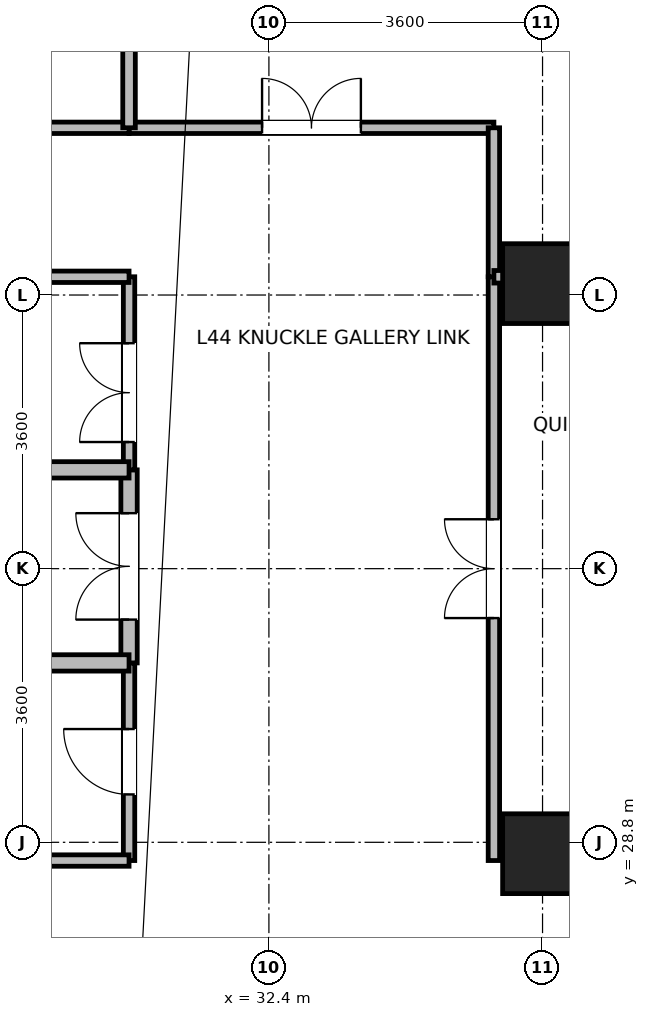
"""IFC4 building model, lengths in metres.
Left out: names, types, materials, properties, quantities, classifications, styles, units other than length and angle.
Written with IfcOpenShell. Run it as: python <this file> out.ifc"""

import sys

from ifc_helpers import new_model, si_unit, direction, frame, frame_2d, origin, origin_2d, place, context, subcontext, project, spatial, rectangle, extrude, source, transform, mapped, element, fill, save


model = new_model("IFC4")
c1 = context("Model", 3, precision=1e-05, world=origin(), true_north=direction((0.0, 1.0)))
c2 = subcontext(c1, "Body", "Model", "MODEL_VIEW")
j1 = project(units=[si_unit("LENGTHUNIT", "METRE"), si_unit("PLANEANGLEUNIT", "RADIAN")], contexts=[c1])
p1 = place(None, origin())
s1 = spatial("IfcSite", under=j1, at=p1, CompositionType="ELEMENT")
p2 = place(p1, origin())
s2 = spatial("IfcBuilding", under=s1, at=p2, CompositionType="ELEMENT")
p3 = place(p2, frame((0.0, 0.0, 173.5)))
s3 = spatial("IfcBuildingStorey", under=s2, at=p3, CompositionType="ELEMENT", Elevation=173.5)
m1 = source(origin(), c2, "Body", "SweptSolid", [
    extrude(rectangle(XDim=1.05, YDim=1.05, at=origin_2d()), origin(), (0.0, 0.0, 1.0), 3.7),
])
for number, where, z_axis, x_axis in (
    (1, (36.0, 28.65, 0.0), (0.0, 0.0, 1.0), (1.0, 0.0, 0.0)),
    (2, (36.0, 36.15, 0.0), (0.0, 0.0, 1.0), (1.0, 0.0, 0.0)),
):
    element("IfcColumn", number, at=place(p3, frame(where, z_axis=z_axis, x_axis=x_axis)), inside=s3, PredefinedType="COLUMN", context=c2, shape_type="MappedRepresentation", body=[
        mapped(m1, transform((0.0, 0.0, 0.0), x_axis=(1.0, 0.0, 0.0), y_axis=(0.0, 1.0, 0.0), z_axis=(0.0, 0.0, 1.0), scale=1.0)),
    ])
p4 = place(p3, frame((35.36, 28.56, 0.0), z_axis=(0.0, 0.0, 1.0), x_axis=(0.0, 1.0, 0.0)))
e3 = element("IfcWall", 3, at=p4, inside=s3, PredefinedType="PARTITIONING", context=c2, shape_type="SweptSolid", body=[
    extrude(rectangle(XDim=7.68, YDim=0.15, at=frame_2d((3.84, 0.0))), origin(), (0.0, 0.0, 1.0), 3.44),
])
p5 = place(p4, frame((3.19, 0.0, 0.0)))
e4 = element("IfcOpeningElement", 4, at=p5, cuts=e3, PredefinedType="OPENING", context=c2, shape_type="SweptSolid", body=[
    extrude(rectangle(XDim=1.3, YDim=2.12, at=frame_2d((0.65, 1.06))), frame((0.0, 0.085, 0.0), z_axis=(0.0, -1.0, 0.0), x_axis=(1.0, 0.0, 0.0)), (0.0, 0.0, 1.0), 0.17),
])
p6 = place(p3, frame((30.56, 38.2, 0.0), z_axis=(0.0, 0.0, 1.0), x_axis=(1.0, 0.0, 0.0)))
e5 = element("IfcWall", 5, at=p6, inside=s3, PredefinedType="PARTITIONING", context=c2, shape_type="SweptSolid", body=[
    extrude(rectangle(XDim=4.8, YDim=0.15, at=frame_2d((2.4, 0.0))), origin(), (0.0, 0.0, 1.0), 3.44),
])
p7 = place(p6, frame((1.75, 0.0, 0.0)))
e6 = element("IfcOpeningElement", 6, at=p7, cuts=e5, PredefinedType="OPENING", context=c2, shape_type="SweptSolid", body=[
    extrude(rectangle(XDim=1.3, YDim=2.12, at=frame_2d((0.65, 1.06))), frame((0.0, 0.085, 0.0), z_axis=(0.0, -1.0, 0.0), x_axis=(1.0, 0.0, 0.0)), (0.0, 0.0, 1.0), 0.17),
])
p8 = place(p3, frame((25.82, 38.2, 0.0), z_axis=(0.0, 0.0, 1.0), x_axis=(1.0, 0.0, 0.0)))
e7 = element("IfcWall", 7, at=p8, inside=s3, PredefinedType="PARTITIONING", context=c2, shape_type="SweptSolid", body=[
    extrude(rectangle(XDim=4.74, YDim=0.15, at=frame_2d((2.37, 0.0))), origin(), (0.0, 0.0, 1.0), 3.44),
])
p9 = place(p8, frame((1.92, 0.0, 0.0)))
e8 = element("IfcOpeningElement", 8, at=p9, cuts=e7, PredefinedType="OPENING", context=c2, shape_type="SweptSolid", body=[
    extrude(rectangle(XDim=0.9, YDim=2.08, at=frame_2d((0.45, 1.04))), frame((0.0, 0.085, 0.0), z_axis=(0.0, -1.0, 0.0), x_axis=(1.0, 0.0, 0.0)), (0.0, 0.0, 1.0), 0.17),
])
p10 = place(p3, frame((30.56, 28.56, 0.0), z_axis=(0.0, 0.0, 1.0), x_axis=(0.0, 1.0, 0.0)))
e9 = element("IfcWall", 9, at=p10, inside=s3, PredefinedType="PARTITIONING", context=c2, shape_type="SweptSolid", body=[
    extrude(rectangle(XDim=2.6, YDim=0.15, at=frame_2d((1.3, 0.0))), origin(), (0.0, 0.0, 1.0), 3.44),
])
p11 = place(p10, frame((0.87, 0.0, 0.0)))
e10 = element("IfcOpeningElement", 10, at=p11, cuts=e9, PredefinedType="OPENING", context=c2, shape_type="SweptSolid", body=[
    extrude(rectangle(XDim=0.86, YDim=2.02, at=frame_2d((0.43, 1.01))), frame((0.0, 0.085, 0.0), z_axis=(0.0, -1.0, 0.0), x_axis=(1.0, 0.0, 0.0)), (0.0, 0.0, 1.0), 0.17),
])
p12 = place(p3, frame((30.56, 31.16, 0.0), z_axis=(0.0, 0.0, 1.0), x_axis=(0.0, 1.0, 0.0)))
e11 = element("IfcWall", 11, at=p12, inside=s3, PredefinedType="PARTITIONING", context=c2, shape_type="SweptSolid", body=[
    extrude(rectangle(XDim=2.54, YDim=0.215, at=frame_2d((1.27, 0.0))), origin(), (0.0, 0.0, 1.0), 3.44),
])
p13 = place(p12, frame((0.57, 0.0, 0.0)))
e12 = element("IfcOpeningElement", 12, at=p13, cuts=e11, PredefinedType="OPENING", context=c2, shape_type="SweptSolid", body=[
    extrude(rectangle(XDim=1.4, YDim=2.15, at=frame_2d((0.7, 1.075))), frame((0.0, 0.118, 0.0), z_axis=(0.0, -1.0, 0.0), x_axis=(1.0, 0.0, 0.0)), (0.0, 0.0, 1.0), 0.235),
])
p14 = place(p3, frame((30.56, 33.7, 0.0), z_axis=(0.0, 0.0, 1.0), x_axis=(0.0, 1.0, 0.0)))
e13 = element("IfcWall", 13, at=p14, inside=s3, PredefinedType="PARTITIONING", context=c2, shape_type="SweptSolid", body=[
    extrude(rectangle(XDim=2.54, YDim=0.15, at=frame_2d((1.27, 0.0))), origin(), (0.0, 0.0, 1.0), 3.44),
])
p15 = place(p14, frame((0.366, 0.0, 0.0)))
e14 = element("IfcOpeningElement", 14, at=p15, cuts=e13, PredefinedType="OPENING", context=c2, shape_type="SweptSolid", body=[
    extrude(rectangle(XDim=1.3, YDim=2.12, at=frame_2d((0.65, 1.06))), frame((0.0, 0.085, 0.0), z_axis=(0.0, -1.0, 0.0), x_axis=(1.0, 0.0, 0.0)), (0.0, 0.0, 1.0), 0.17),
])
p16 = place(p3, frame((35.36, 36.24, 0.0), z_axis=(0.0, 0.0, 1.0), x_axis=(0.0, 1.0, 0.0)))
e15 = element("IfcWall", 15, at=p16, inside=s3, PredefinedType="PARTITIONING", context=c2, shape_type="SweptSolid", body=[
    extrude(rectangle(XDim=1.96, YDim=0.15, at=frame_2d((0.98, 0.0))), origin(), (0.0, 0.0, 1.0), 3.44),
])
for number, where, z_axis, x_axis in (
    (16, (29.325, 28.56, 0.0), (0.0, 0.0, 1.0), (1.0, 0.0, 0.0)),
    (17, (29.325, 36.24, 0.0), (0.0, 0.0, 1.0), (1.0, 0.0, 0.0)),
):
    element("IfcWall", number, at=place(p3, frame(where, z_axis=z_axis, x_axis=x_axis)), inside=s3, PredefinedType="PARTITIONING", context=c2, shape_type="SweptSolid", body=[
        extrude(rectangle(XDim=1.235, YDim=0.15, at=frame_2d((0.618, 0.0))), origin(), (0.0, 0.0, 1.0), 2.84),
    ])
p17 = place(p3, frame((30.56, 38.2, 0.0), z_axis=(0.0, 0.0, 1.0), x_axis=(0.0, 1.0, 0.0)))
e18 = element("IfcWall", 18, at=p17, inside=s3, PredefinedType="PARTITIONING", context=c2, shape_type="SweptSolid", body=[
    extrude(rectangle(XDim=4.868, YDim=0.165, at=frame_2d((2.434, 0.0))), origin(), (0.0, 0.0, 1.0), 3.44),
])
p18 = place(p3, frame((35.36, 36.24, 0.0), z_axis=(0.0, 0.0, 1.0), x_axis=(1.0, 0.0, 0.0)))
e19 = element("IfcWall", 19, at=p18, inside=s3, PredefinedType="PARTITIONING", context=c2, shape_type="SweptSolid", body=[
    extrude(rectangle(XDim=4.38, YDim=0.165, at=frame_2d((2.19, 0.0))), origin(), (0.0, 0.0, 1.0), 2.84),
])
for number, where, z_axis, x_axis in (
    (20, (28.84, 31.16, 0.0), (0.0, 0.0, 1.0), (1.0, 0.0, 0.0)),
    (21, (28.84, 33.7, 0.0), (0.0, 0.0, 1.0), (1.0, 0.0, 0.0)),
):
    element("IfcWall", number, at=place(p3, frame(where, z_axis=z_axis, x_axis=x_axis)), inside=s3, PredefinedType="PARTITIONING", context=c2, shape_type="SweptSolid", body=[
        extrude(rectangle(XDim=1.72, YDim=0.215, at=frame_2d((0.86, 0.0))), origin(), (0.0, 0.0, 1.0), 3.44),
    ])
p19 = place(p5, origin())
e22 = element("IfcDoor", 22, at=p19, inside=s3, OperationType="DOUBLE_DOOR_SINGLE_SWING", PredefinedType="DOOR", context=c2, shape_type="SweptSolid", body=[
    extrude(rectangle(XDim=1.3, YDim=2.12, at=frame_2d((0.65, 1.06))), frame((0.0, 0.025, 0.0), z_axis=(0.0, -1.0, 0.0), x_axis=(1.0, 0.0, 0.0)), (0.0, 0.0, 1.0), 0.05),
])
fill(e4, e22)
p20 = place(p7, origin())
e23 = element("IfcDoor", 23, at=p20, inside=s3, OperationType="DOUBLE_DOOR_SINGLE_SWING", PredefinedType="DOOR", context=c2, shape_type="SweptSolid", body=[
    extrude(rectangle(XDim=1.3, YDim=2.12, at=frame_2d((0.65, 1.06))), frame((0.0, 0.025, 0.0), z_axis=(0.0, -1.0, 0.0), x_axis=(1.0, 0.0, 0.0)), (0.0, 0.0, 1.0), 0.05),
])
fill(e6, e23)
p21 = place(p11, origin())
e24 = element("IfcDoor", 24, at=p21, inside=s3, OperationType="SINGLE_SWING_RIGHT", PredefinedType="DOOR", context=c2, shape_type="SweptSolid", body=[
    extrude(rectangle(XDim=0.86, YDim=2.02, at=frame_2d((0.43, 1.01))), frame((0.0, 0.025, 0.0), z_axis=(0.0, -1.0, 0.0), x_axis=(1.0, 0.0, 0.0)), (0.0, 0.0, 1.0), 0.05),
])
fill(e10, e24)
p22 = place(p13, origin())
e25 = element("IfcDoor", 25, at=p22, inside=s3, OperationType="DOUBLE_DOOR_SINGLE_SWING", PredefinedType="DOOR", context=c2, shape_type="SweptSolid", body=[
    extrude(rectangle(XDim=1.4, YDim=2.15, at=frame_2d((0.7, 1.075))), frame((0.0, 0.025, 0.0), z_axis=(0.0, -1.0, 0.0), x_axis=(1.0, 0.0, 0.0)), (0.0, 0.0, 1.0), 0.05),
])
fill(e12, e25)
p23 = place(p15, origin())
e26 = element("IfcDoor", 26, at=p23, inside=s3, OperationType="DOUBLE_DOOR_SINGLE_SWING", PredefinedType="DOOR", context=c2, shape_type="SweptSolid", body=[
    extrude(rectangle(XDim=1.3, YDim=2.12, at=frame_2d((0.65, 1.06))), frame((0.0, 0.025, 0.0), z_axis=(0.0, -1.0, 0.0), x_axis=(1.0, 0.0, 0.0)), (0.0, 0.0, 1.0), 0.05),
])
fill(e14, e26)
save(model, sys.argv[1])
